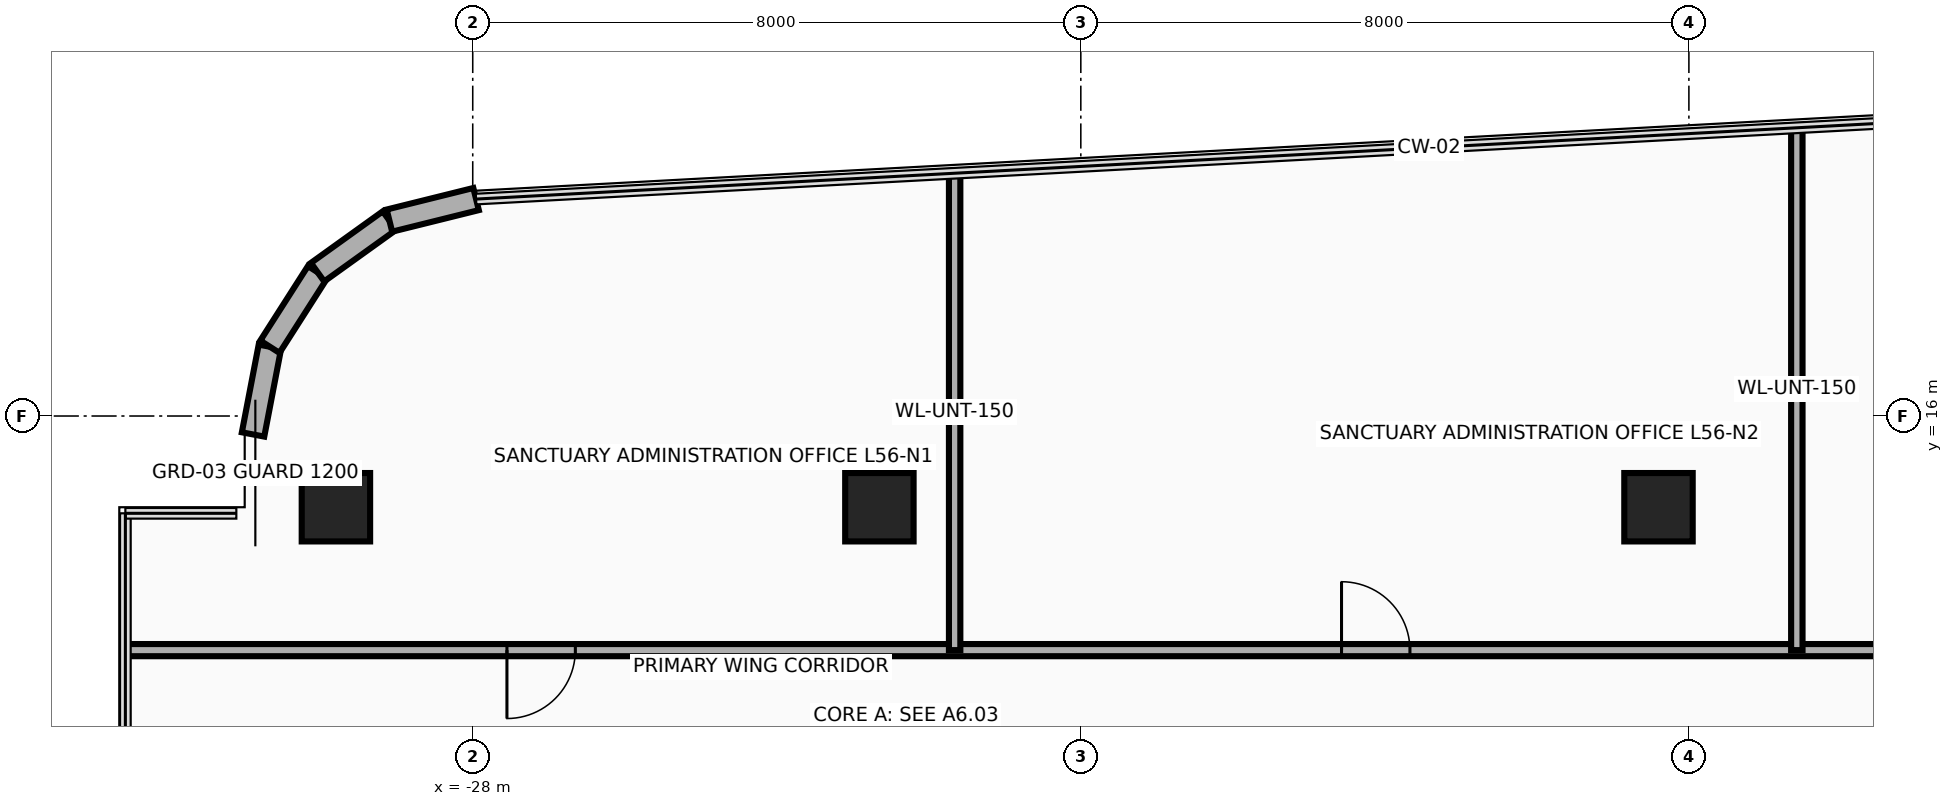
"""IFC4 building model, lengths in metres.
Left out: names, types, materials, properties, quantities, classifications, styles, units other than length and angle.
Written with IfcOpenShell. Run it as: python <this file> out.ifc"""

import sys

from ifc_helpers import new_model, si_unit, direction, frame, frame_2d, origin, origin_2d, place, context, subcontext, project, spatial, rectangle, extrude, source, transform, mapped, element, fill, save


model = new_model("IFC4")
c1 = context("Model", 3, precision=1e-05, world=origin(), true_north=direction((0.0, 1.0)))
c2 = subcontext(c1, "Body", "Model", "MODEL_VIEW")
j1 = project(units=[si_unit("LENGTHUNIT", "METRE"), si_unit("PLANEANGLEUNIT", "RADIAN")], contexts=[c1])
p1 = place(None, origin())
s1 = spatial("IfcSite", under=j1, at=p1, CompositionType="ELEMENT")
p2 = place(p1, origin())
s2 = spatial("IfcBuilding", under=s1, at=p2, CompositionType="ELEMENT")
p3 = place(p2, frame((0.0, 0.0, 219.5)))
s3 = spatial("IfcBuildingStorey", under=s2, at=p3, CompositionType="ELEMENT", Elevation=219.5)
m1 = source(origin(), c2, "Body", "SweptSolid", [
    extrude(rectangle(XDim=0.9, YDim=0.9, at=origin_2d()), origin(), (0.0, 0.0, 1.0), 3.5),
])
for number, where, z_axis, x_axis in (
    (1, (-29.8, 14.8, 0.0), (0.0, 0.0, 1.0), (1.0, 0.0, 0.0)),
    (2, (-22.65, 14.8, 0.0), (0.0, 0.0, 1.0), (1.0, 0.0, 0.0)),
    (3, (-12.4, 14.8, 0.0), (0.0, 0.0, 1.0), (1.0, 0.0, 0.0)),
):
    element("IfcColumn", number, at=place(p3, frame(where, z_axis=z_axis, x_axis=x_axis)), inside=s3, PredefinedType="COLUMN", context=c2, shape_type="MappedRepresentation", body=[
        mapped(m1, transform((0.0, 0.0, 0.0), x_axis=(1.0, 0.0, 0.0), y_axis=(0.0, 1.0, 0.0), z_axis=(0.0, 0.0, 1.0), scale=1.0)),
    ])
p4 = place(p3, frame((-30.89, 15.758, 0.0), z_axis=(0.0, 0.0, 1.0), x_axis=(0.18831542659, 0.982108598938, 0.0)))
e4 = element("IfcWall", 4, at=p4, inside=s3, PredefinedType="SOLIDWALL", context=c2, shape_type="SweptSolid", body=[
    extrude(rectangle(XDim=1.175, YDim=0.3, at=frame_2d((0.587, 0.0))), origin(), (0.0, 0.0, 1.0), 3.26),
])
p5 = place(p3, frame((-30.669, 16.911, 0.0), z_axis=(0.0, 0.0, 1.0), x_axis=(0.538678781902, 0.84251122837, 0.0)))
e5 = element("IfcWall", 5, at=p5, inside=s3, PredefinedType="SOLIDWALL", context=c2, shape_type="SweptSolid", body=[
    extrude(rectangle(XDim=1.164, YDim=0.3, at=frame_2d((0.582, 0.0))), origin(), (0.0, 0.0, 1.0), 3.26),
])
p6 = place(p3, frame((-30.042, 17.892, 0.0), z_axis=(0.0, 0.0, 1.0), x_axis=(0.812313539683, 0.583220981487, 0.0)))
e6 = element("IfcWall", 6, at=p6, inside=s3, PredefinedType="SOLIDWALL", context=c2, shape_type="SweptSolid", body=[
    extrude(rectangle(XDim=1.164, YDim=0.3, at=frame_2d((0.582, 0.0))), origin(), (0.0, 0.0, 1.0), 3.26),
])
p7 = place(p3, frame((-29.096, 18.571, 0.0), z_axis=(0.0, 0.0, 1.0), x_axis=(0.97050812798, 0.241068400098, 0.0)))
e7 = element("IfcWall", 7, at=p7, inside=s3, PredefinedType="SOLIDWALL", context=c2, shape_type="SweptSolid", body=[
    extrude(rectangle(XDim=1.175, YDim=0.3, at=frame_2d((0.587, 0.0))), origin(), (0.0, 0.0, 1.0), 3.26),
])
p8 = place(p3, frame((-32.54, 12.92, 0.0), z_axis=(0.0, 0.0, 1.0), x_axis=(1.0, 0.0, 0.0)))
e8 = element("IfcWall", 8, at=p8, inside=s3, PredefinedType="PARTITIONING", context=c2, shape_type="SweptSolid", body=[
    extrude(rectangle(XDim=32.93, YDim=0.16, at=frame_2d((16.465, 0.0))), origin(), (0.0, 0.0, 1.0), 2.634),
])
p9 = place(p8, frame((4.99, 0.0, 0.0)))
e9 = element("IfcOpeningElement", 9, at=p9, cuts=e8, PredefinedType="OPENING", context=c2, shape_type="SweptSolid", body=[
    extrude(rectangle(XDim=0.9, YDim=2.1, at=frame_2d((0.45, 1.05))), frame((0.0, 0.095, 0.0), z_axis=(0.0, -1.0, 0.0), x_axis=(1.0, 0.0, 0.0)), (0.0, 0.0, 1.0), 0.19),
])
p10 = place(p8, frame((15.97, 0.0, 0.0)))
e10 = element("IfcOpeningElement", 10, at=p10, cuts=e8, PredefinedType="OPENING", context=c2, shape_type="SweptSolid", body=[
    extrude(rectangle(XDim=0.9, YDim=2.1, at=frame_2d((0.45, 1.05))), frame((0.0, 0.095, 0.0), z_axis=(0.0, -1.0, 0.0), x_axis=(1.0, 0.0, 0.0)), (0.0, 0.0, 1.0), 0.19),
])
p11 = place(p8, frame((26.995, 0.0, 0.0)))
e11 = element("IfcOpeningElement", 11, at=p11, cuts=e8, PredefinedType="OPENING", context=c2, shape_type="SweptSolid", body=[
    extrude(rectangle(XDim=0.9, YDim=2.1, at=frame_2d((0.45, 1.05))), frame((0.0, 0.095, 0.0), z_axis=(0.0, -1.0, 0.0), x_axis=(1.0, 0.0, 0.0)), (0.0, 0.0, 1.0), 0.19),
])
p12 = place(p3, frame((-21.66, 12.92, 0.0), z_axis=(0.0, 0.0, 1.0), x_axis=(0.0, 1.0, 0.0)))
e12 = element("IfcWall", 12, at=p12, inside=s3, PredefinedType="PARTITIONING", context=c2, shape_type="SweptSolid", body=[
    extrude(rectangle(XDim=6.274, YDim=0.15, at=frame_2d((3.137, 0.0))), origin(), (0.0, 0.0, 1.0), 2.544),
])
p13 = place(p3, frame((-10.58, 12.92, 0.0), z_axis=(0.0, 0.0, 1.0), x_axis=(0.0, 1.0, 0.0)))
e13 = element("IfcWall", 13, at=p13, inside=s3, PredefinedType="PARTITIONING", context=c2, shape_type="SweptSolid", body=[
    extrude(rectangle(XDim=6.872, YDim=0.15, at=frame_2d((3.436, 0.0))), origin(), (0.0, 0.0, 1.0), 2.544),
])
p14 = place(p9, frame((0.9, 0.0, 0.0), z_axis=(0.0, 0.0, 1.0), x_axis=(-1.0, 0.0, 0.0)))
e14 = element("IfcDoor", 14, at=p14, inside=s3, OperationType="SINGLE_SWING_LEFT", PredefinedType="DOOR", context=c2, shape_type="SweptSolid", body=[
    extrude(rectangle(XDim=0.9, YDim=2.1, at=frame_2d((0.45, 1.05))), frame((0.0, 0.025, 0.0), z_axis=(0.0, -1.0, 0.0), x_axis=(1.0, 0.0, 0.0)), (0.0, 0.0, 1.0), 0.05),
])
fill(e9, e14)
p15 = place(p10, origin())
e15 = element("IfcDoor", 15, at=p15, inside=s3, OperationType="SINGLE_SWING_RIGHT", PredefinedType="DOOR", context=c2, shape_type="SweptSolid", body=[
    extrude(rectangle(XDim=0.9, YDim=2.1, at=frame_2d((0.45, 1.05))), frame((0.0, 0.025, 0.0), z_axis=(0.0, -1.0, 0.0), x_axis=(1.0, 0.0, 0.0)), (0.0, 0.0, 1.0), 0.05),
])
fill(e10, e15)
save(model, sys.argv[1])
